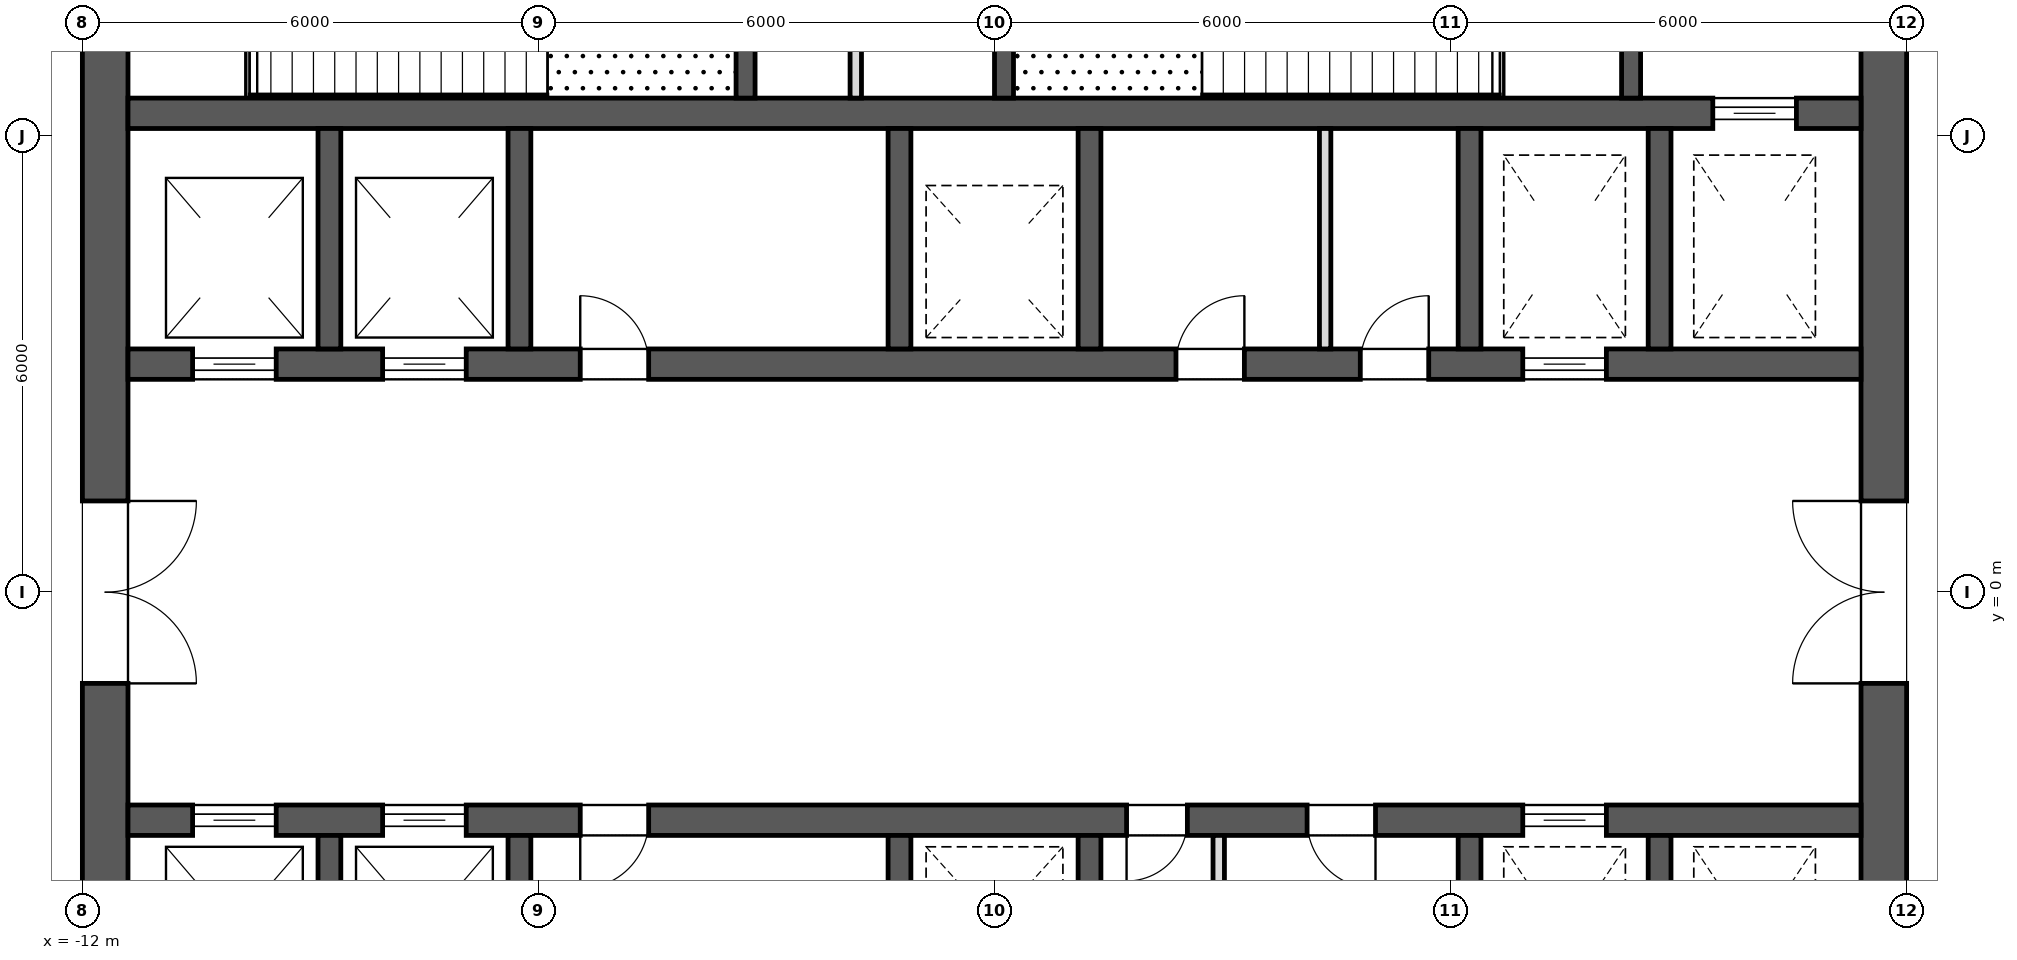
"""IFC4 building model, lengths in metres.
Left out: names, types, materials, properties, quantities, classifications, styles, units other than length and angle.
Written with IfcOpenShell. Run it as: python <this file> out.ifc"""

import sys

from ifc_helpers import new_model, si_unit, direction, frame, frame_2d, origin, place, context, subcontext, project, spatial, rectangle, extrude, element, fill, save


model = new_model("IFC4")
c1 = context("Model", 3, precision=1e-05, world=origin(), true_north=direction((0.0, 1.0)))
c2 = subcontext(c1, "Body", "Model", "MODEL_VIEW")
j1 = project(units=[si_unit("LENGTHUNIT", "METRE"), si_unit("PLANEANGLEUNIT", "RADIAN")], contexts=[c1])
p1 = place(None, origin())
s1 = spatial("IfcSite", under=j1, at=p1, CompositionType="ELEMENT")
p2 = place(p1, origin())
s2 = spatial("IfcBuilding", under=s1, at=p2, CompositionType="ELEMENT")
p3 = place(p2, frame((0.0, 0.0, 333.3)))
s3 = spatial("IfcBuildingStorey", under=s2, at=p3, CompositionType="ELEMENT", Elevation=333.3)
p4 = place(p3, frame((11.7, -11.4, 0.0), z_axis=(0.0, 0.0, 1.0), x_axis=(0.0, 1.0, 0.0)))
e1 = element("IfcWall", 1, at=p4, inside=s3, PredefinedType="SHEAR", context=c2, shape_type="SweptSolid", body=[
    extrude(rectangle(XDim=22.8, YDim=0.6, at=frame_2d((11.4, 0.0))), origin(), (0.0, 0.0, 1.0), 5.0),
])
p5 = place(p4, frame((10.2, 0.0, 0.0)))
e2 = element("IfcOpeningElement", 2, at=p5, cuts=e1, PredefinedType="OPENING", context=c2, shape_type="SweptSolid", body=[
    extrude(rectangle(XDim=2.4, YDim=2.1, at=frame_2d((1.2, 1.05))), frame((0.0, 0.312, 0.0), z_axis=(0.0, -1.0, 0.0), x_axis=(1.0, 0.0, 0.0)), (0.0, 0.0, 1.0), 0.624),
])
p6 = place(p4, frame((19.5, 0.0, 0.0)))
e3 = element("IfcOpeningElement", 3, at=p6, cuts=e1, PredefinedType="OPENING", context=c2, shape_type="SweptSolid", body=[
    extrude(rectangle(XDim=1.2, YDim=2.1, at=frame_2d((0.6, 1.05))), frame((0.0, 0.312, 0.0), z_axis=(0.0, -1.0, 0.0), x_axis=(1.0, 0.0, 0.0)), (0.0, 0.0, 1.0), 0.624),
])
p7 = place(p4, frame((2.1, 0.0, 0.0)))
e4 = element("IfcOpeningElement", 4, at=p7, cuts=e1, PredefinedType="OPENING", context=c2, shape_type="SweptSolid", body=[
    extrude(rectangle(XDim=1.2, YDim=2.1, at=frame_2d((0.6, 1.05))), frame((0.0, 0.312, 0.0), z_axis=(0.0, -1.0, 0.0), x_axis=(1.0, 0.0, 0.0)), (0.0, 0.0, 1.0), 0.624),
])
p8 = place(p3, frame((-11.7, -11.4, 0.0), z_axis=(0.0, 0.0, 1.0), x_axis=(0.0, 1.0, 0.0)))
e5 = element("IfcWall", 5, at=p8, inside=s3, PredefinedType="SHEAR", context=c2, shape_type="SweptSolid", body=[
    extrude(rectangle(XDim=22.8, YDim=0.6, at=frame_2d((11.4, 0.0))), origin(), (0.0, 0.0, 1.0), 5.0),
])
p9 = place(p8, frame((10.2, 0.0, 0.0)))
e6 = element("IfcOpeningElement", 6, at=p9, cuts=e5, PredefinedType="OPENING", context=c2, shape_type="SweptSolid", body=[
    extrude(rectangle(XDim=2.4, YDim=2.1, at=frame_2d((1.2, 1.05))), frame((0.0, 0.312, 0.0), z_axis=(0.0, -1.0, 0.0), x_axis=(1.0, 0.0, 0.0)), (0.0, 0.0, 1.0), 0.624),
])
p10 = place(p8, frame((18.925, 0.0, 0.0)))
e7 = element("IfcOpeningElement", 7, at=p10, cuts=e5, PredefinedType="OPENING", context=c2, shape_type="SweptSolid", body=[
    extrude(rectangle(XDim=1.2, YDim=2.1, at=frame_2d((0.6, 1.05))), frame((0.0, 0.312, 0.0), z_axis=(0.0, -1.0, 0.0), x_axis=(1.0, 0.0, 0.0)), (0.0, 0.0, 1.0), 0.624),
])
p11 = place(p8, frame((2.675, 0.0, 0.0)))
e8 = element("IfcOpeningElement", 8, at=p11, cuts=e5, PredefinedType="OPENING", context=c2, shape_type="SweptSolid", body=[
    extrude(rectangle(XDim=1.2, YDim=2.1, at=frame_2d((0.6, 1.05))), frame((0.0, 0.312, 0.0), z_axis=(0.0, -1.0, 0.0), x_axis=(1.0, 0.0, 0.0)), (0.0, 0.0, 1.0), 0.624),
])
p12 = place(p3, frame((-11.4, 3.0, 0.0), z_axis=(0.0, 0.0, 1.0), x_axis=(1.0, 0.0, 0.0)))
e9 = element("IfcWall", 9, at=p12, inside=s3, PredefinedType="SHEAR", context=c2, shape_type="SweptSolid", body=[
    extrude(rectangle(XDim=22.8, YDim=0.4, at=frame_2d((11.4, 0.0))), origin(), (0.0, 0.0, 1.0), 5.0),
])
p13 = place(p12, frame((0.85, 0.0, 0.0)))
e10 = element("IfcOpeningElement", 10, at=p13, cuts=e9, PredefinedType="OPENING", context=c2, shape_type="SweptSolid", body=[
    extrude(rectangle(XDim=1.1, YDim=2.1, at=frame_2d((0.55, 1.05))), frame((0.0, 0.212, 0.0), z_axis=(0.0, -1.0, 0.0), x_axis=(1.0, 0.0, 0.0)), (0.0, 0.0, 1.0), 0.424),
])
p14 = place(p12, frame((3.35, 0.0, 0.0)))
e11 = element("IfcOpeningElement", 11, at=p14, cuts=e9, PredefinedType="OPENING", context=c2, shape_type="SweptSolid", body=[
    extrude(rectangle(XDim=1.1, YDim=2.1, at=frame_2d((0.55, 1.05))), frame((0.0, 0.212, 0.0), z_axis=(0.0, -1.0, 0.0), x_axis=(1.0, 0.0, 0.0)), (0.0, 0.0, 1.0), 0.424),
])
p15 = place(p12, frame((18.35, 0.0, 0.0)))
e12 = element("IfcOpeningElement", 12, at=p15, cuts=e9, PredefinedType="OPENING", context=c2, shape_type="SweptSolid", body=[
    extrude(rectangle(XDim=1.1, YDim=2.1, at=frame_2d((0.55, 1.05))), frame((0.0, 0.212, 0.0), z_axis=(0.0, -1.0, 0.0), x_axis=(1.0, 0.0, 0.0)), (0.0, 0.0, 1.0), 0.424),
])
p16 = place(p12, frame((13.788, 0.0, 0.0)))
e13 = element("IfcOpeningElement", 13, at=p16, cuts=e9, PredefinedType="OPENING", context=c2, shape_type="SweptSolid", body=[
    extrude(rectangle(XDim=0.9, YDim=2.1, at=frame_2d((0.45, 1.05))), frame((0.0, 0.212, 0.0), z_axis=(0.0, -1.0, 0.0), x_axis=(1.0, 0.0, 0.0)), (0.0, 0.0, 1.0), 0.424),
])
p17 = place(p12, frame((16.212, 0.0, 0.0)))
e14 = element("IfcOpeningElement", 14, at=p17, cuts=e9, PredefinedType="OPENING", context=c2, shape_type="SweptSolid", body=[
    extrude(rectangle(XDim=0.9, YDim=2.1, at=frame_2d((0.45, 1.05))), frame((0.0, 0.212, 0.0), z_axis=(0.0, -1.0, 0.0), x_axis=(1.0, 0.0, 0.0)), (0.0, 0.0, 1.0), 0.424),
])
p18 = place(p12, frame((5.95, 0.0, 0.0)))
e15 = element("IfcOpeningElement", 15, at=p18, cuts=e9, PredefinedType="OPENING", context=c2, shape_type="SweptSolid", body=[
    extrude(rectangle(XDim=0.9, YDim=2.1, at=frame_2d((0.45, 1.05))), frame((0.0, 0.212, 0.0), z_axis=(0.0, -1.0, 0.0), x_axis=(1.0, 0.0, 0.0)), (0.0, 0.0, 1.0), 0.424),
])
p19 = place(p3, frame((-11.4, 6.3, 0.0), z_axis=(0.0, 0.0, 1.0), x_axis=(1.0, 0.0, 0.0)))
e16 = element("IfcWall", 16, at=p19, inside=s3, PredefinedType="SHEAR", context=c2, shape_type="SweptSolid", body=[
    extrude(rectangle(XDim=22.8, YDim=0.4, at=frame_2d((11.4, 0.0))), origin(), (0.0, 0.0, 1.0), 5.0),
])
p20 = place(p19, frame((20.85, 0.0, 0.0)))
e17 = element("IfcOpeningElement", 17, at=p20, cuts=e16, PredefinedType="OPENING", context=c2, shape_type="SweptSolid", body=[
    extrude(rectangle(XDim=1.1, YDim=2.1, at=frame_2d((0.55, 1.05))), frame((0.0, 0.212, 0.0), z_axis=(0.0, -1.0, 0.0), x_axis=(1.0, 0.0, 0.0)), (0.0, 0.0, 1.0), 0.424),
])
for number, where, z_axis, x_axis in (
    (18, (-8.75, 3.2, 0.0), (0.0, 0.0, 1.0), (0.0, 1.0, 0.0)),
    (19, (-6.25, 3.2, 0.0), (0.0, 0.0, 1.0), (0.0, 1.0, 0.0)),
    (20, (-1.25, 3.2, 0.0), (0.0, 0.0, 1.0), (0.0, 1.0, 0.0)),
    (21, (1.25, 3.2, 0.0), (0.0, 0.0, 1.0), (0.0, 1.0, 0.0)),
    (22, (6.25, 3.2, 0.0), (0.0, 0.0, 1.0), (0.0, 1.0, 0.0)),
    (23, (8.75, 3.2, 0.0), (0.0, 0.0, 1.0), (0.0, 1.0, 0.0)),
):
    element("IfcWall", number, at=place(p3, frame(where, z_axis=z_axis, x_axis=x_axis)), inside=s3, PredefinedType="SHEAR", context=c2, shape_type="SweptSolid", body=[
        extrude(rectangle(XDim=2.9, YDim=0.3, at=frame_2d((1.45, 0.0))), origin(), (0.0, 0.0, 1.0), 5.0),
    ])
p21 = place(p3, frame((-11.4, -3.0, 0.0), z_axis=(0.0, 0.0, 1.0), x_axis=(1.0, 0.0, 0.0)))
e24 = element("IfcWall", 24, at=p21, inside=s3, PredefinedType="SHEAR", context=c2, shape_type="SweptSolid", body=[
    extrude(rectangle(XDim=22.8, YDim=0.4, at=frame_2d((11.4, 0.0))), origin(), (0.0, 0.0, 1.0), 5.0),
])
p22 = place(p21, frame((0.85, 0.0, 0.0)))
e25 = element("IfcOpeningElement", 25, at=p22, cuts=e24, PredefinedType="OPENING", context=c2, shape_type="SweptSolid", body=[
    extrude(rectangle(XDim=1.1, YDim=2.1, at=frame_2d((0.55, 1.05))), frame((0.0, 0.212, 0.0), z_axis=(0.0, -1.0, 0.0), x_axis=(1.0, 0.0, 0.0)), (0.0, 0.0, 1.0), 0.424),
])
p23 = place(p21, frame((3.35, 0.0, 0.0)))
e26 = element("IfcOpeningElement", 26, at=p23, cuts=e24, PredefinedType="OPENING", context=c2, shape_type="SweptSolid", body=[
    extrude(rectangle(XDim=1.1, YDim=2.1, at=frame_2d((0.55, 1.05))), frame((0.0, 0.212, 0.0), z_axis=(0.0, -1.0, 0.0), x_axis=(1.0, 0.0, 0.0)), (0.0, 0.0, 1.0), 0.424),
])
p24 = place(p21, frame((18.35, 0.0, 0.0)))
e27 = element("IfcOpeningElement", 27, at=p24, cuts=e24, PredefinedType="OPENING", context=c2, shape_type="SweptSolid", body=[
    extrude(rectangle(XDim=1.1, YDim=2.1, at=frame_2d((0.55, 1.05))), frame((0.0, 0.212, 0.0), z_axis=(0.0, -1.0, 0.0), x_axis=(1.0, 0.0, 0.0)), (0.0, 0.0, 1.0), 0.424),
])
p25 = place(p21, frame((13.137, 0.0, 0.0)))
e28 = element("IfcOpeningElement", 28, at=p25, cuts=e24, PredefinedType="OPENING", context=c2, shape_type="SweptSolid", body=[
    extrude(rectangle(XDim=0.8, YDim=2.1, at=frame_2d((0.4, 1.05))), frame((0.0, 0.212, 0.0), z_axis=(0.0, -1.0, 0.0), x_axis=(1.0, 0.0, 0.0)), (0.0, 0.0, 1.0), 0.424),
])
p26 = place(p21, frame((15.512, 0.0, 0.0)))
e29 = element("IfcOpeningElement", 29, at=p26, cuts=e24, PredefinedType="OPENING", context=c2, shape_type="SweptSolid", body=[
    extrude(rectangle(XDim=0.9, YDim=2.1, at=frame_2d((0.45, 1.05))), frame((0.0, 0.212, 0.0), z_axis=(0.0, -1.0, 0.0), x_axis=(1.0, 0.0, 0.0)), (0.0, 0.0, 1.0), 0.424),
])
p27 = place(p21, frame((5.95, 0.0, 0.0)))
e30 = element("IfcOpeningElement", 30, at=p27, cuts=e24, PredefinedType="OPENING", context=c2, shape_type="SweptSolid", body=[
    extrude(rectangle(XDim=0.9, YDim=2.1, at=frame_2d((0.45, 1.05))), frame((0.0, 0.212, 0.0), z_axis=(0.0, -1.0, 0.0), x_axis=(1.0, 0.0, 0.0)), (0.0, 0.0, 1.0), 0.424),
])
for number, where, z_axis, x_axis in (
    (31, (-8.75, -6.1, 0.0), (0.0, 0.0, 1.0), (0.0, 1.0, 0.0)),
    (32, (-6.25, -6.1, 0.0), (0.0, 0.0, 1.0), (0.0, 1.0, 0.0)),
    (33, (-1.25, -6.1, 0.0), (0.0, 0.0, 1.0), (0.0, 1.0, 0.0)),
    (34, (1.25, -6.1, 0.0), (0.0, 0.0, 1.0), (0.0, 1.0, 0.0)),
    (35, (6.25, -6.1, 0.0), (0.0, 0.0, 1.0), (0.0, 1.0, 0.0)),
    (36, (8.75, -6.1, 0.0), (0.0, 0.0, 1.0), (0.0, 1.0, 0.0)),
):
    element("IfcWall", number, at=place(p3, frame(where, z_axis=z_axis, x_axis=x_axis)), inside=s3, PredefinedType="SHEAR", context=c2, shape_type="SweptSolid", body=[
        extrude(rectangle(XDim=2.9, YDim=0.3, at=frame_2d((1.45, 0.0))), origin(), (0.0, 0.0, 1.0), 5.0),
    ])
for number, where, z_axis, x_axis in (
    (37, (-3.275, 6.5, 0.0), (0.0, 0.0, 1.0), (0.0, 1.0, 0.0)),
    (38, (0.125, 6.5, 0.0), (0.0, 0.0, 1.0), (0.0, 1.0, 0.0)),
):
    element("IfcWall", number, at=place(p3, frame(where, z_axis=z_axis, x_axis=x_axis)), inside=s3, PredefinedType="SHEAR", context=c2, shape_type="SweptSolid", body=[
        extrude(rectangle(XDim=4.9, YDim=0.25, at=frame_2d((2.45, 0.0))), origin(), (0.0, 0.0, 1.0), 4.65),
    ])
p28 = place(p3, frame((8.375, 6.5, 0.0), z_axis=(0.0, 0.0, 1.0), x_axis=(0.0, 1.0, 0.0)))
e39 = element("IfcWall", 39, at=p28, inside=s3, PredefinedType="SHEAR", context=c2, shape_type="SweptSolid", body=[
    extrude(rectangle(XDim=3.4, YDim=0.25, at=frame_2d((1.7, 0.0))), origin(), (0.0, 0.0, 1.0), 4.65),
])
p29 = place(p28, frame((1.025, 0.0, 0.0)))
e40 = element("IfcOpeningElement", 40, at=p29, cuts=e39, PredefinedType="OPENING", context=c2, shape_type="SweptSolid", body=[
    extrude(rectangle(XDim=1.2, YDim=2.1, at=frame_2d((0.6, 1.05))), frame((0.0, 0.137, 0.0), z_axis=(0.0, -1.0, 0.0), x_axis=(1.0, 0.0, 0.0)), (0.0, 0.0, 1.0), 0.274),
])
p30 = place(p3, frame((-1.825, 6.5, 0.0), z_axis=(0.0, 0.0, 1.0), x_axis=(0.0, 1.0, 0.0)))
e41 = element("IfcWall", 41, at=p30, inside=s3, PredefinedType="PARTITIONING", context=c2, shape_type="SweptSolid", body=[
    extrude(rectangle(XDim=4.9, YDim=0.15, at=frame_2d((2.45, 0.0))), origin(), (0.0, 0.0, 1.0), 4.65),
])
for number, where, z_axis, x_axis in (
    (42, (4.35, 3.2, 0.0), (0.0, 0.0, 1.0), (0.0, 1.0, 0.0)),
    (43, (2.95, -6.1, 0.0), (0.0, 0.0, 1.0), (0.0, 1.0, 0.0)),
):
    element("IfcWall", number, at=place(p3, frame(where, z_axis=z_axis, x_axis=x_axis)), inside=s3, PredefinedType="PARTITIONING", context=c2, shape_type="SweptSolid", body=[
        extrude(rectangle(XDim=2.9, YDim=0.15, at=frame_2d((1.45, 0.0))), origin(), (0.0, 0.0, 1.0), 4.65),
    ])
p31 = place(p20, origin())
e44 = element("IfcDoor", 44, at=p31, inside=s3, OperationType="SLIDING_TO_LEFT", PredefinedType="DOOR", context=c2, shape_type="SweptSolid", body=[
    extrude(rectangle(XDim=1.1, YDim=2.1, at=frame_2d((0.55, 1.05))), frame((0.0, 0.025, 0.0), z_axis=(0.0, -1.0, 0.0), x_axis=(1.0, 0.0, 0.0)), (0.0, 0.0, 1.0), 0.05),
])
fill(e17, e44)
p32 = place(p13, origin())
e45 = element("IfcDoor", 45, at=p32, inside=s3, OperationType="SLIDING_TO_LEFT", PredefinedType="DOOR", context=c2, shape_type="SweptSolid", body=[
    extrude(rectangle(XDim=1.1, YDim=2.1, at=frame_2d((0.55, 1.05))), frame((0.0, 0.025, 0.0), z_axis=(0.0, -1.0, 0.0), x_axis=(1.0, 0.0, 0.0)), (0.0, 0.0, 1.0), 0.05),
])
fill(e10, e45)
p33 = place(p14, origin())
e46 = element("IfcDoor", 46, at=p33, inside=s3, OperationType="SLIDING_TO_LEFT", PredefinedType="DOOR", context=c2, shape_type="SweptSolid", body=[
    extrude(rectangle(XDim=1.1, YDim=2.1, at=frame_2d((0.55, 1.05))), frame((0.0, 0.025, 0.0), z_axis=(0.0, -1.0, 0.0), x_axis=(1.0, 0.0, 0.0)), (0.0, 0.0, 1.0), 0.05),
])
fill(e11, e46)
p34 = place(p22, origin())
e47 = element("IfcDoor", 47, at=p34, inside=s3, OperationType="SLIDING_TO_LEFT", PredefinedType="DOOR", context=c2, shape_type="SweptSolid", body=[
    extrude(rectangle(XDim=1.1, YDim=2.1, at=frame_2d((0.55, 1.05))), frame((0.0, 0.025, 0.0), z_axis=(0.0, -1.0, 0.0), x_axis=(1.0, 0.0, 0.0)), (0.0, 0.0, 1.0), 0.05),
])
fill(e25, e47)
p35 = place(p23, origin())
e48 = element("IfcDoor", 48, at=p35, inside=s3, OperationType="SLIDING_TO_LEFT", PredefinedType="DOOR", context=c2, shape_type="SweptSolid", body=[
    extrude(rectangle(XDim=1.1, YDim=2.1, at=frame_2d((0.55, 1.05))), frame((0.0, 0.025, 0.0), z_axis=(0.0, -1.0, 0.0), x_axis=(1.0, 0.0, 0.0)), (0.0, 0.0, 1.0), 0.05),
])
fill(e26, e48)
p36 = place(p15, origin())
e49 = element("IfcDoor", 49, at=p36, inside=s3, OperationType="SLIDING_TO_LEFT", PredefinedType="DOOR", context=c2, shape_type="SweptSolid", body=[
    extrude(rectangle(XDim=1.1, YDim=2.1, at=frame_2d((0.55, 1.05))), frame((0.0, 0.025, 0.0), z_axis=(0.0, -1.0, 0.0), x_axis=(1.0, 0.0, 0.0)), (0.0, 0.0, 1.0), 0.05),
])
fill(e12, e49)
p37 = place(p24, origin())
e50 = element("IfcDoor", 50, at=p37, inside=s3, OperationType="SLIDING_TO_LEFT", PredefinedType="DOOR", context=c2, shape_type="SweptSolid", body=[
    extrude(rectangle(XDim=1.1, YDim=2.1, at=frame_2d((0.55, 1.05))), frame((0.0, 0.025, 0.0), z_axis=(0.0, -1.0, 0.0), x_axis=(1.0, 0.0, 0.0)), (0.0, 0.0, 1.0), 0.05),
])
fill(e27, e50)
p38 = place(p9, frame((2.4, 0.0, 0.0), z_axis=(0.0, 0.0, 1.0), x_axis=(-1.0, 0.0, 0.0)))
e51 = element("IfcDoor", 51, at=p38, inside=s3, OperationType="DOUBLE_DOOR_SINGLE_SWING", PredefinedType="DOOR", context=c2, shape_type="SweptSolid", body=[
    extrude(rectangle(XDim=2.4, YDim=2.1, at=frame_2d((1.2, 1.05))), frame((0.0, 0.025, 0.0), z_axis=(0.0, -1.0, 0.0), x_axis=(1.0, 0.0, 0.0)), (0.0, 0.0, 1.0), 0.05),
])
fill(e6, e51)
p39 = place(p5, origin())
e52 = element("IfcDoor", 52, at=p39, inside=s3, OperationType="DOUBLE_DOOR_SINGLE_SWING", PredefinedType="DOOR", context=c2, shape_type="SweptSolid", body=[
    extrude(rectangle(XDim=2.4, YDim=2.1, at=frame_2d((1.2, 1.05))), frame((0.0, 0.025, 0.0), z_axis=(0.0, -1.0, 0.0), x_axis=(1.0, 0.0, 0.0)), (0.0, 0.0, 1.0), 0.05),
])
fill(e2, e52)
p40 = place(p16, origin())
e53 = element("IfcDoor", 53, at=p40, inside=s3, OperationType="SINGLE_SWING_LEFT", PredefinedType="DOOR", context=c2, shape_type="SweptSolid", body=[
    extrude(rectangle(XDim=0.9, YDim=2.1, at=frame_2d((0.45, 1.05))), frame((0.0, 0.025, 0.0), z_axis=(0.0, -1.0, 0.0), x_axis=(1.0, 0.0, 0.0)), (0.0, 0.0, 1.0), 0.05),
])
fill(e13, e53)
p41 = place(p17, origin())
e54 = element("IfcDoor", 54, at=p41, inside=s3, OperationType="SINGLE_SWING_LEFT", PredefinedType="DOOR", context=c2, shape_type="SweptSolid", body=[
    extrude(rectangle(XDim=0.9, YDim=2.1, at=frame_2d((0.45, 1.05))), frame((0.0, 0.025, 0.0), z_axis=(0.0, -1.0, 0.0), x_axis=(1.0, 0.0, 0.0)), (0.0, 0.0, 1.0), 0.05),
])
fill(e14, e54)
p42 = place(p18, origin())
e55 = element("IfcDoor", 55, at=p42, inside=s3, OperationType="SINGLE_SWING_RIGHT", PredefinedType="DOOR", context=c2, shape_type="SweptSolid", body=[
    extrude(rectangle(XDim=0.9, YDim=2.1, at=frame_2d((0.45, 1.05))), frame((0.0, 0.025, 0.0), z_axis=(0.0, -1.0, 0.0), x_axis=(1.0, 0.0, 0.0)), (0.0, 0.0, 1.0), 0.05),
])
fill(e15, e55)
p43 = place(p25, frame((0.8, 0.0, 0.0), z_axis=(0.0, 0.0, 1.0), x_axis=(-1.0, 0.0, 0.0)))
e56 = element("IfcDoor", 56, at=p43, inside=s3, OperationType="SINGLE_SWING_LEFT", PredefinedType="DOOR", context=c2, shape_type="SweptSolid", body=[
    extrude(rectangle(XDim=0.8, YDim=2.1, at=frame_2d((0.4, 1.05))), frame((0.0, 0.025, 0.0), z_axis=(0.0, -1.0, 0.0), x_axis=(1.0, 0.0, 0.0)), (0.0, 0.0, 1.0), 0.05),
])
fill(e28, e56)
p44 = place(p26, frame((0.9, 0.0, 0.0), z_axis=(0.0, 0.0, 1.0), x_axis=(-1.0, 0.0, 0.0)))
e57 = element("IfcDoor", 57, at=p44, inside=s3, OperationType="SINGLE_SWING_RIGHT", PredefinedType="DOOR", context=c2, shape_type="SweptSolid", body=[
    extrude(rectangle(XDim=0.9, YDim=2.1, at=frame_2d((0.45, 1.05))), frame((0.0, 0.025, 0.0), z_axis=(0.0, -1.0, 0.0), x_axis=(1.0, 0.0, 0.0)), (0.0, 0.0, 1.0), 0.05),
])
fill(e29, e57)
p45 = place(p27, frame((0.9, 0.0, 0.0), z_axis=(0.0, 0.0, 1.0), x_axis=(-1.0, 0.0, 0.0)))
e58 = element("IfcDoor", 58, at=p45, inside=s3, OperationType="SINGLE_SWING_LEFT", PredefinedType="DOOR", context=c2, shape_type="SweptSolid", body=[
    extrude(rectangle(XDim=0.9, YDim=2.1, at=frame_2d((0.45, 1.05))), frame((0.0, 0.025, 0.0), z_axis=(0.0, -1.0, 0.0), x_axis=(1.0, 0.0, 0.0)), (0.0, 0.0, 1.0), 0.05),
])
fill(e30, e58)
save(model, sys.argv[1])
